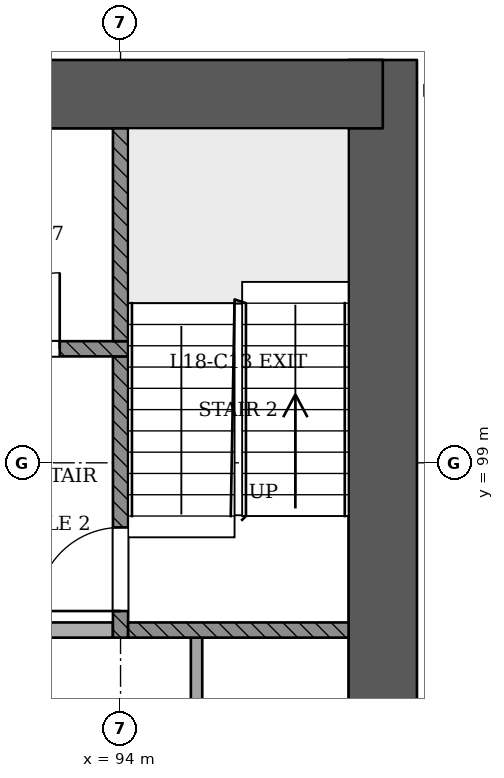
"""IFC4 building model, lengths in metres.
Left out: names, types, materials, properties, quantities, classifications, styles, units other than length and angle.
Written with IfcOpenShell. Run it as: python <this file> out.ifc"""

import sys

from ifc_helpers import new_model, si_unit, direction, frame, frame_2d, origin, place, context, subcontext, project, spatial, rectangle, extrude, element, fill, save


model = new_model("IFC4")
c1 = context("Model", 3, precision=1e-05, world=origin(), true_north=direction((0.0, 1.0)))
c2 = subcontext(c1, "Body", "Model", "MODEL_VIEW")
j1 = project(units=[si_unit("LENGTHUNIT", "METRE"), si_unit("PLANEANGLEUNIT", "RADIAN")], contexts=[c1])
p1 = place(None, origin())
s1 = spatial("IfcSite", under=j1, at=p1, CompositionType="ELEMENT")
p2 = place(p1, origin())
s2 = spatial("IfcBuilding", under=s1, at=p2, CompositionType="ELEMENT")
p3 = place(p2, frame((0.0, 0.0, 73.8)))
s3 = spatial("IfcBuildingStorey", under=s2, at=p3, CompositionType="ELEMENT", Elevation=73.8)
p4 = place(p3, frame((97.45, 92.95, 0.0), z_axis=(0.0, 0.0, 1.0), x_axis=(0.0, 1.0, 0.0)))
e1 = element("IfcWall", 1, at=p4, inside=s3, PredefinedType="SHEAR", context=c2, shape_type="SweptSolid", body=[
    extrude(rectangle(XDim=11.35, YDim=0.9, at=frame_2d((5.675, 0.0))), origin(), (0.0, 0.0, 1.0), 3.6),
])
p5 = place(p3, frame((97.45, 103.85, 0.0), z_axis=(0.0, 0.0, 1.0), x_axis=(-1.0, 0.0, 0.0)))
e2 = element("IfcWall", 2, at=p5, inside=s3, PredefinedType="SHEAR", context=c2, shape_type="SweptSolid", body=[
    extrude(rectangle(XDim=25.35, YDim=0.9, at=frame_2d((12.675, 0.0))), origin(), (0.0, 0.0, 1.0), 3.6),
])
p6 = place(p3, frame((85.747, 59.896, 0.0), z_axis=(0.0, 0.0, 1.0), x_axis=(0.500002549277, 0.866023931954, 0.0)))
e3 = element("IfcWall", 3, at=p6, inside=s3, PredefinedType="PARTITIONING", context=c2, shape_type="SweptSolid", body=[
    extrude(rectangle(XDim=43.082, YDim=0.15, at=frame_2d((21.541, 0.0))), origin(), (0.0, 0.0, 1.0), 2.7),
])
p7 = place(p6, frame((0.244, 0.0, 0.0)))
e4 = element("IfcOpeningElement", 4, at=p7, cuts=e3, PredefinedType="OPENING", context=c2, shape_type="SweptSolid", body=[
    extrude(rectangle(XDim=1.2, YDim=2.1, at=frame_2d((0.6, 1.05))), frame((0.0, 0.085, 0.0), z_axis=(0.0, -1.0, 0.0), x_axis=(1.0, 0.0, 0.0)), (0.0, 0.0, 1.0), 0.171),
])
p8 = place(p6, frame((4.146, 0.0, 0.0)))
e5 = element("IfcOpeningElement", 5, at=p8, cuts=e3, PredefinedType="OPENING", context=c2, shape_type="SweptSolid", body=[
    extrude(rectangle(XDim=1.0, YDim=2.1, at=frame_2d((0.5, 1.05))), frame((0.0, 0.085, 0.0), z_axis=(0.0, -1.0, 0.0), x_axis=(1.0, 0.0, 0.0)), (0.0, 0.0, 1.0), 0.171),
])
p9 = place(p6, frame((10.821, 0.0, 0.0)))
e6 = element("IfcOpeningElement", 6, at=p9, cuts=e3, PredefinedType="OPENING", context=c2, shape_type="SweptSolid", body=[
    extrude(rectangle(XDim=1.0, YDim=2.1, at=frame_2d((0.5, 1.05))), frame((0.0, 0.085, 0.0), z_axis=(0.0, -1.0, 0.0), x_axis=(1.0, 0.0, 0.0)), (0.0, 0.0, 1.0), 0.171),
])
p10 = place(p6, frame((13.262, 0.0, 0.0)))
e7 = element("IfcOpeningElement", 7, at=p10, cuts=e3, PredefinedType="OPENING", context=c2, shape_type="SweptSolid", body=[
    extrude(rectangle(XDim=1.0, YDim=2.1, at=frame_2d((0.5, 1.05))), frame((0.0, 0.085, 0.0), z_axis=(0.0, -1.0, 0.0), x_axis=(1.0, 0.0, 0.0)), (0.0, 0.0, 1.0), 0.171),
])
p11 = place(p6, frame((20.941, 0.0, 0.0)))
e8 = element("IfcOpeningElement", 8, at=p11, cuts=e3, PredefinedType="OPENING", context=c2, shape_type="SweptSolid", body=[
    extrude(rectangle(XDim=1.2, YDim=2.1, at=frame_2d((0.6, 1.05))), frame((0.0, 0.085, 0.0), z_axis=(0.0, -1.0, 0.0), x_axis=(1.0, 0.0, 0.0)), (0.0, 0.0, 1.0), 0.171),
])
p12 = place(p6, frame((28.821, 0.0, 0.0)))
e9 = element("IfcOpeningElement", 9, at=p12, cuts=e3, PredefinedType="OPENING", context=c2, shape_type="SweptSolid", body=[
    extrude(rectangle(XDim=1.0, YDim=2.1, at=frame_2d((0.5, 1.05))), frame((0.0, 0.085, 0.0), z_axis=(0.0, -1.0, 0.0), x_axis=(1.0, 0.0, 0.0)), (0.0, 0.0, 1.0), 0.171),
])
p13 = place(p6, frame((31.112, 0.0, 0.0)))
e10 = element("IfcOpeningElement", 10, at=p13, cuts=e3, PredefinedType="OPENING", context=c2, shape_type="SweptSolid", body=[
    extrude(rectangle(XDim=1.1, YDim=2.1, at=frame_2d((0.55, 1.05))), frame((0.0, 0.085, 0.0), z_axis=(0.0, -1.0, 0.0), x_axis=(1.0, 0.0, 0.0)), (0.0, 0.0, 1.0), 0.171),
])
p14 = place(p6, frame((38.514, 0.0, 0.0)))
e11 = element("IfcOpeningElement", 11, at=p14, cuts=e3, PredefinedType="OPENING", context=c2, shape_type="SweptSolid", body=[
    extrude(rectangle(XDim=1.2, YDim=2.1, at=frame_2d((0.6, 1.05))), frame((0.0, 0.085, 0.0), z_axis=(0.0, -1.0, 0.0), x_axis=(1.0, 0.0, 0.0)), (0.0, 0.0, 1.0), 0.171),
])
p15 = place(p3, frame((95.0, 93.4, 0.0), z_axis=(0.0, 0.0, 1.0), x_axis=(0.0, 1.0, 0.0)))
e12 = element("IfcWall", 12, at=p15, inside=s3, PredefinedType="PARTITIONING", context=c2, shape_type="SweptSolid", body=[
    extrude(rectangle(XDim=3.3, YDim=0.15, at=frame_2d((1.65, 0.0))), origin(), (0.0, 0.0, 1.0), 3.1),
])
p16 = place(p3, frame((91.5, 96.8, 0.0), z_axis=(0.0, 0.0, 1.0), x_axis=(1.0, 0.0, 0.0)))
e13 = element("IfcWall", 13, at=p16, inside=s3, PredefinedType="PARTITIONING", context=c2, shape_type="SweptSolid", body=[
    extrude(rectangle(XDim=2.4, YDim=0.2, at=frame_2d((1.2, 0.0))), origin(), (0.0, 0.0, 1.0), 3.1),
])
p17 = place(p3, frame((94.0, 96.7, 0.0), z_axis=(0.0, 0.0, 1.0), x_axis=(0.0, 1.0, 0.0)))
e14 = element("IfcWall", 14, at=p17, inside=s3, PredefinedType="SOLIDWALL", context=c2, shape_type="SweptSolid", body=[
    extrude(rectangle(XDim=3.7, YDim=0.2, at=frame_2d((1.85, 0.0))), origin(), (0.0, 0.0, 1.0), 3.1),
])
p18 = place(p17, frame((0.35, 0.0, 0.0)))
e15 = element("IfcOpeningElement", 15, at=p18, cuts=e14, PredefinedType="OPENING", context=c2, shape_type="SweptSolid", body=[
    extrude(rectangle(XDim=1.1, YDim=2.1, at=frame_2d((0.55, 1.05))), frame((0.0, 0.11, 0.0), z_axis=(0.0, -1.0, 0.0), x_axis=(1.0, 0.0, 0.0)), (0.0, 0.0, 1.0), 0.221),
])
p19 = place(p3, frame((94.1, 96.8, 0.0), z_axis=(0.0, 0.0, 1.0), x_axis=(1.0, 0.0, 0.0)))
e16 = element("IfcWall", 16, at=p19, inside=s3, PredefinedType="SOLIDWALL", context=c2, shape_type="SweptSolid", body=[
    extrude(rectangle(XDim=2.9, YDim=0.2, at=frame_2d((1.45, 0.0))), origin(), (0.0, 0.0, 1.0), 3.1),
])
p20 = place(p3, frame((75.9, 100.5, 0.0), z_axis=(0.0, 0.0, 1.0), x_axis=(1.0, 0.0, 0.0)))
e17 = element("IfcWall", 17, at=p20, inside=s3, PredefinedType="SOLIDWALL", context=c2, shape_type="SweptSolid", body=[
    extrude(rectangle(XDim=18.2, YDim=0.2, at=frame_2d((9.1, 0.0))), origin(), (0.0, 0.0, 1.0), 3.1),
])
p21 = place(p20, frame((2.6, 0.0, 0.0)))
e18 = element("IfcOpeningElement", 18, at=p21, cuts=e17, PredefinedType="OPENING", context=c2, shape_type="SweptSolid", body=[
    extrude(rectangle(XDim=1.1, YDim=2.1, at=frame_2d((0.55, 1.05))), frame((0.0, 0.11, 0.0), z_axis=(0.0, -1.0, 0.0), x_axis=(1.0, 0.0, 0.0)), (0.0, 0.0, 1.0), 0.221),
])
p22 = place(p20, frame((4.5, 0.0, 0.0)))
e19 = element("IfcOpeningElement", 19, at=p22, cuts=e17, PredefinedType="OPENING", context=c2, shape_type="SweptSolid", body=[
    extrude(rectangle(XDim=1.1, YDim=2.1, at=frame_2d((0.55, 1.05))), frame((0.0, 0.11, 0.0), z_axis=(0.0, -1.0, 0.0), x_axis=(1.0, 0.0, 0.0)), (0.0, 0.0, 1.0), 0.221),
])
p23 = place(p20, frame((6.4, 0.0, 0.0)))
e20 = element("IfcOpeningElement", 20, at=p23, cuts=e17, PredefinedType="OPENING", context=c2, shape_type="SweptSolid", body=[
    extrude(rectangle(XDim=1.1, YDim=2.1, at=frame_2d((0.55, 1.05))), frame((0.0, 0.11, 0.0), z_axis=(0.0, -1.0, 0.0), x_axis=(1.0, 0.0, 0.0)), (0.0, 0.0, 1.0), 0.221),
])
p24 = place(p20, frame((8.3, 0.0, 0.0)))
e21 = element("IfcOpeningElement", 21, at=p24, cuts=e17, PredefinedType="OPENING", context=c2, shape_type="SweptSolid", body=[
    extrude(rectangle(XDim=1.1, YDim=2.1, at=frame_2d((0.55, 1.05))), frame((0.0, 0.11, 0.0), z_axis=(0.0, -1.0, 0.0), x_axis=(1.0, 0.0, 0.0)), (0.0, 0.0, 1.0), 0.221),
])
p25 = place(p20, frame((10.2, 0.0, 0.0)))
e22 = element("IfcOpeningElement", 22, at=p25, cuts=e17, PredefinedType="OPENING", context=c2, shape_type="SweptSolid", body=[
    extrude(rectangle(XDim=1.1, YDim=2.1, at=frame_2d((0.55, 1.05))), frame((0.0, 0.11, 0.0), z_axis=(0.0, -1.0, 0.0), x_axis=(1.0, 0.0, 0.0)), (0.0, 0.0, 1.0), 0.221),
])
p26 = place(p20, frame((12.1, 0.0, 0.0)))
e23 = element("IfcOpeningElement", 23, at=p26, cuts=e17, PredefinedType="OPENING", context=c2, shape_type="SweptSolid", body=[
    extrude(rectangle(XDim=1.1, YDim=2.1, at=frame_2d((0.55, 1.05))), frame((0.0, 0.11, 0.0), z_axis=(0.0, -1.0, 0.0), x_axis=(1.0, 0.0, 0.0)), (0.0, 0.0, 1.0), 0.221),
])
p27 = place(p20, frame((14.0, 0.0, 0.0)))
e24 = element("IfcOpeningElement", 24, at=p27, cuts=e17, PredefinedType="OPENING", context=c2, shape_type="SweptSolid", body=[
    extrude(rectangle(XDim=1.1, YDim=2.1, at=frame_2d((0.55, 1.05))), frame((0.0, 0.11, 0.0), z_axis=(0.0, -1.0, 0.0), x_axis=(1.0, 0.0, 0.0)), (0.0, 0.0, 1.0), 0.221),
])
p28 = place(p20, frame((0.65, 0.0, 0.0)))
e25 = element("IfcOpeningElement", 25, at=p28, cuts=e17, PredefinedType="OPENING", context=c2, shape_type="SweptSolid", body=[
    extrude(rectangle(XDim=1.0, YDim=2.1, at=frame_2d((0.5, 1.05))), frame((0.0, 0.11, 0.0), z_axis=(0.0, -1.0, 0.0), x_axis=(1.0, 0.0, 0.0)), (0.0, 0.0, 1.0), 0.221),
])
p29 = place(p20, frame((16.3, 0.0, 0.0)))
e26 = element("IfcOpeningElement", 26, at=p29, cuts=e17, PredefinedType="OPENING", context=c2, shape_type="SweptSolid", body=[
    extrude(rectangle(XDim=1.0, YDim=2.1, at=frame_2d((0.5, 1.05))), frame((0.0, 0.11, 0.0), z_axis=(0.0, -1.0, 0.0), x_axis=(1.0, 0.0, 0.0)), (0.0, 0.0, 1.0), 0.221),
])
p30 = place(p3, frame((94.0, 100.6, 0.0), z_axis=(0.0, 0.0, 1.0), x_axis=(0.0, 1.0, 0.0)))
e27 = element("IfcWall", 27, at=p30, inside=s3, PredefinedType="SOLIDWALL", context=c2, shape_type="SweptSolid", body=[
    extrude(rectangle(XDim=2.8, YDim=0.2, at=frame_2d((1.4, 0.0))), origin(), (0.0, 0.0, 1.0), 3.1),
])
p31 = place(p18, origin())
e28 = element("IfcDoor", 28, at=p31, inside=s3, OperationType="SINGLE_SWING_LEFT", PredefinedType="NOTDEFINED", context=c2, shape_type="SweptSolid", body=[
    extrude(rectangle(XDim=1.1, YDim=2.1, at=frame_2d((0.55, 1.05))), frame((0.0, 0.025, 0.0), z_axis=(0.0, -1.0, 0.0), x_axis=(1.0, 0.0, 0.0)), (0.0, 0.0, 1.0), 0.05),
])
fill(e15, e28)
p32 = place(p29, origin())
e29 = element("IfcDoor", 29, at=p32, inside=s3, OperationType="SINGLE_SWING_RIGHT", PredefinedType="NOTDEFINED", context=c2, shape_type="SweptSolid", body=[
    extrude(rectangle(XDim=1.0, YDim=2.1, at=frame_2d((0.5, 1.05))), frame((0.0, 0.025, 0.0), z_axis=(0.0, -1.0, 0.0), x_axis=(1.0, 0.0, 0.0)), (0.0, 0.0, 1.0), 0.05),
])
fill(e26, e29)
save(model, sys.argv[1])
